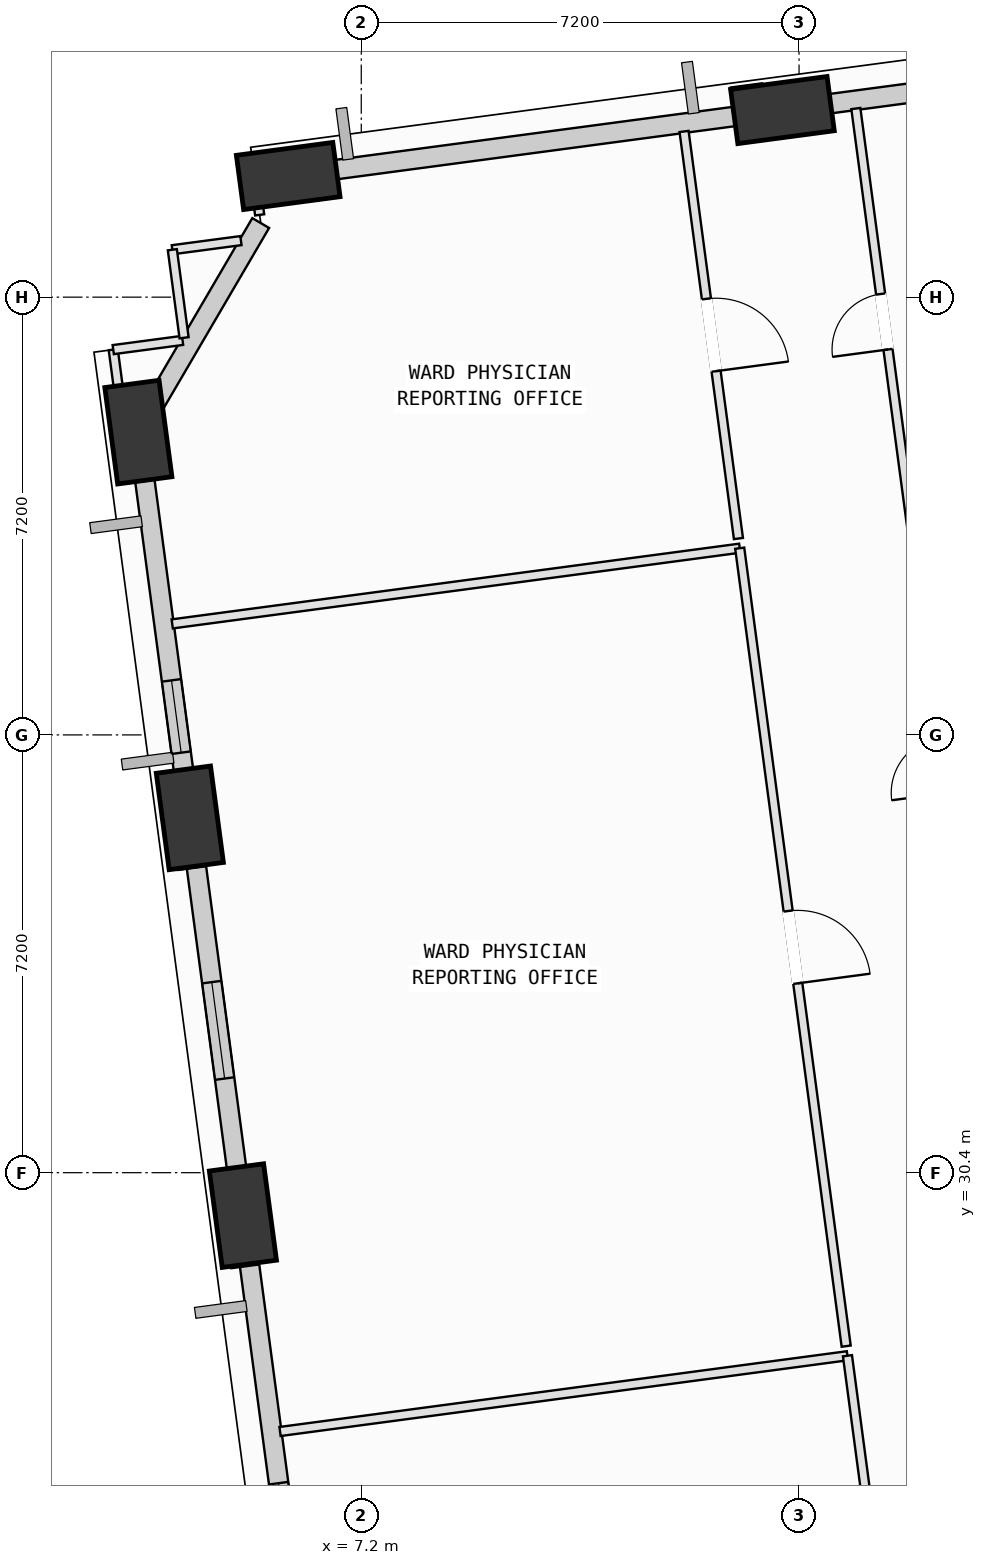
"""IFC4 building model, lengths in metres.
Left out: names, types, materials, properties, quantities, classifications, styles, units other than length and angle.
Written with IfcOpenShell. Run it as: python <this file> out.ifc"""

import sys

from ifc_helpers import new_model, si_unit, direction, frame, frame_2d, origin, origin_2d, place, context, subcontext, project, spatial, rectangle, extrude, element, fill, save


model = new_model("IFC4")
c1 = context("Model", 3, precision=1e-05, world=origin(), true_north=direction((0.0, 1.0)))
c2 = subcontext(c1, "Body", "Model", "MODEL_VIEW")
j1 = project(units=[si_unit("LENGTHUNIT", "METRE"), si_unit("PLANEANGLEUNIT", "RADIAN")], contexts=[c1])
p1 = place(None, origin())
s1 = spatial("IfcSite", under=j1, at=p1, CompositionType="ELEMENT")
p2 = place(p1, origin())
s2 = spatial("IfcBuilding", under=s1, at=p2, CompositionType="ELEMENT")
p3 = place(p2, frame((0.0, 0.0, 55.0)))
s3 = spatial("IfcBuildingStorey", under=s2, at=p3, CompositionType="ELEMENT", Elevation=55.0)
p4 = place(p3, frame((14.127, 47.877, 0.002), z_axis=(-0.0942550357, -0.080919918109, 0.992253977114), x_axis=(0.745242646619, -0.666590927141, 0.016429653498)))
e1 = element("IfcColumn", 1, at=p4, inside=s3, PredefinedType="COLUMN", context=c2, shape_type="SweptSolid", body=[
    extrude(rectangle(XDim=1.6, YDim=0.9, at=origin_2d()), origin(), (0.0, 0.0, 1.0), 4.028),
])
p5 = place(p3, frame((5.999, 46.792, 0.002), z_axis=(-0.089275820597, -0.113936981601, 0.989468641282), x_axis=(0.86094163533, -0.508343404316, 0.019143767761)))
e2 = element("IfcColumn", 2, at=p5, inside=s3, PredefinedType="COLUMN", context=c2, shape_type="SweptSolid", body=[
    extrude(rectangle(XDim=1.6, YDim=0.9, at=origin_2d()), origin(), (0.0, 0.0, 1.0), 4.039),
])
p6 = place(p3, frame((3.534, 42.58, 0.002), z_axis=(-0.071883508788, -0.123937084117, 0.98968295951), x_axis=(0.377774089532, 0.914941616728, 0.142016109148)))
e3 = element("IfcColumn", 3, at=p6, inside=s3, PredefinedType="COLUMN", context=c2, shape_type="SweptSolid", body=[
    extrude(rectangle(XDim=1.6, YDim=0.9, at=origin_2d()), origin(), (0.0, 0.0, 1.0), 4.038),
])
p7 = place(p3, frame((4.381, 36.236, 0.002), z_axis=(-0.0460385753, -0.120487797725, 0.991646681124), x_axis=(0.227297063468, 0.965396391624, 0.127850897445)))
e4 = element("IfcColumn", 4, at=p7, inside=s3, PredefinedType="COLUMN", context=c2, shape_type="SweptSolid", body=[
    extrude(rectangle(XDim=1.6, YDim=0.9, at=origin_2d()), origin(), (0.0, 0.0, 1.0), 4.03),
])
p8 = place(p3, frame((5.254, 29.694, 0.002), z_axis=(-0.019167847977, -0.116826820265, 0.992967314503), x_axis=(0.028843585156, 0.992671797796, 0.11734883662)))
e5 = element("IfcColumn", 5, at=p8, inside=s3, PredefinedType="COLUMN", context=c2, shape_type="SweptSolid", body=[
    extrude(rectangle(XDim=1.6, YDim=0.9, at=origin_2d()), origin(), (0.0, 0.0, 1.0), 4.025),
])
p9 = place(p3, frame((14.506, 47.928, 0.0), z_axis=(0.0, 0.0, 1.0), x_axis=(0.991218459324, 0.132234510981, 0.0)))
e6 = element("IfcWall", 6, at=p9, inside=s3, PredefinedType="SOLIDWALL", context=c2, shape_type="SweptSolid", body=[
    extrude(rectangle(XDim=7.003, YDim=0.32, at=frame_2d((3.501, 0.0))), origin(), (0.0, 0.0, 1.0), 3.165),
])
p10 = place(p3, frame((6.359, 46.841, 0.0), z_axis=(0.0, 0.0, 1.0), x_axis=(0.991214255341, 0.132266019857, 0.0)))
e7 = element("IfcWall", 7, at=p10, inside=s3, PredefinedType="SOLIDWALL", context=c2, shape_type="SweptSolid", body=[
    extrude(rectangle(XDim=7.034, YDim=0.32, at=frame_2d((3.517, 0.0))), origin(), (0.0, 0.0, 1.0), 3.165),
])
p11 = place(p3, frame((3.695, 42.854, 0.0), z_axis=(0.0, 0.0, 1.0), x_axis=(0.504934807204, 0.863157483009, 0.0)))
e8 = element("IfcWall", 8, at=p11, inside=s3, PredefinedType="SOLIDWALL", context=c2, shape_type="SweptSolid", body=[
    extrude(rectangle(XDim=3.666, YDim=0.32, at=frame_2d((1.833, 0.0))), origin(), (0.0, 0.0, 1.0), 3.165),
])
p12 = place(p3, frame((4.333, 36.599, 0.0), z_axis=(0.0, 0.0, 1.0), x_axis=(-0.132286193068, 0.991211563252, 0.0)))
e9 = element("IfcWall", 9, at=p12, inside=s3, PredefinedType="SOLIDWALL", context=c2, shape_type="SweptSolid", body=[
    extrude(rectangle(XDim=5.223, YDim=0.32, at=frame_2d((2.611, 0.0))), origin(), (0.0, 0.0, 1.0), 3.165),
])
p13 = place(p12, frame((0.715, 0.0, 0.75)))
e10 = element("IfcOpeningElement", 10, at=p13, cuts=e9, PredefinedType="OPENING", context=c2, shape_type="SweptSolid", body=[
    extrude(rectangle(XDim=1.2, YDim=1.75, at=frame_2d((0.6, 0.875))), frame((0.0, 0.17, 0.0), z_axis=(0.0, -1.0, 0.0), x_axis=(1.0, 0.0, 0.0)), (0.0, 0.0, 1.0), 0.34),
])
p14 = place(p3, frame((5.204, 30.066, 0.0), z_axis=(0.0, 0.0, 1.0), x_axis=(-0.132270316662, 0.991213681973, 0.0)))
e11 = element("IfcWall", 11, at=p14, inside=s3, PredefinedType="SOLIDWALL", context=c2, shape_type="SweptSolid", body=[
    extrude(rectangle(XDim=5.401, YDim=0.32, at=frame_2d((2.7, 0.0))), origin(), (0.0, 0.0, 1.0), 3.165),
])
p15 = place(p14, frame((1.898, 0.0, 0.75)))
e12 = element("IfcOpeningElement", 12, at=p15, cuts=e11, PredefinedType="OPENING", context=c2, shape_type="SweptSolid", body=[
    extrude(rectangle(XDim=1.6, YDim=1.95, at=frame_2d((0.8, 0.975))), frame((0.0, 0.17, 0.0), z_axis=(0.0, -1.0, 0.0), x_axis=(1.0, 0.0, 0.0)), (0.0, 0.0, 1.0), 0.34),
])
p16 = place(p3, frame((6.083, 23.479, 0.0), z_axis=(0.0, 0.0, 1.0), x_axis=(-0.132257820525, 0.991215349412, 0.0)))
e13 = element("IfcWall", 13, at=p16, inside=s3, PredefinedType="SOLIDWALL", context=c2, shape_type="SweptSolid", body=[
    extrude(rectangle(XDim=5.438, YDim=0.32, at=frame_2d((2.719, 0.0))), origin(), (0.0, 0.0, 1.0), 3.165),
])
p17 = place(p16, frame((0.63, 0.0, 0.75)))
e14 = element("IfcOpeningElement", 14, at=p17, cuts=e13, PredefinedType="OPENING", context=c2, shape_type="SweptSolid", body=[
    extrude(rectangle(XDim=1.2, YDim=1.75, at=frame_2d((0.6, 0.875))), frame((0.0, 0.17, 0.0), z_axis=(0.0, -1.0, 0.0), x_axis=(1.0, 0.0, 0.0)), (0.0, 0.0, 1.0), 0.34),
])
p18 = place(p3, frame((5.864, 26.143, 0.0), z_axis=(0.0, 0.0, 1.0), x_axis=(0.991205918813, 0.132328479586, 0.0)))
e15 = element("IfcWall", 15, at=p18, inside=s3, PredefinedType="PARTITIONING", context=c2, shape_type="SweptSolid", body=[
    extrude(rectangle(XDim=9.415, YDim=0.15, at=frame_2d((4.708, 0.0))), origin(), (0.0, 0.0, 1.0), 3.78),
])
p19 = place(p3, frame((15.196, 27.389, 0.0), z_axis=(0.0, 0.0, 1.0), x_axis=(0.132180016539, -0.991225727687, 0.0)))
e16 = element("IfcWall", 16, at=p19, inside=s3, PredefinedType="PARTITIONING", context=c2, shape_type="SweptSolid", body=[
    extrude(rectangle(XDim=6.869, YDim=0.15, at=frame_2d((3.435, 0.0))), origin(), (0.0, 0.0, 1.0), 3.78),
])
p20 = place(p19, frame((2.835, 0.0, 0.0)))
e17 = element("IfcOpeningElement", 17, at=p20, cuts=e16, PredefinedType="OPENING", context=c2, shape_type="SweptSolid", body=[
    extrude(rectangle(XDim=1.2, YDim=2.15, at=frame_2d((0.6, 1.075))), frame((0.0, 0.085, 0.0), z_axis=(0.0, -1.0, 0.0), x_axis=(1.0, 0.0, 0.0)), (0.0, 0.0, 1.0), 0.17),
])
p21 = place(p3, frame((4.091, 39.426, 0.0), z_axis=(0.0, 0.0, 1.0), x_axis=(0.991221332239, 0.132212974079, 0.0)))
e18 = element("IfcWall", 18, at=p21, inside=s3, PredefinedType="PARTITIONING", context=c2, shape_type="SweptSolid", body=[
    extrude(rectangle(XDim=9.416, YDim=0.15, at=frame_2d((4.708, 0.0))), origin(), (0.0, 0.0, 1.0), 3.78),
])
p22 = place(p3, frame((13.424, 40.671, 0.0), z_axis=(0.0, 0.0, 1.0), x_axis=(0.132248267647, -0.991216624005, 0.0)))
e19 = element("IfcWall", 19, at=p22, inside=s3, PredefinedType="PARTITIONING", context=c2, shape_type="SweptSolid", body=[
    extrude(rectangle(XDim=13.24, YDim=0.15, at=frame_2d((6.62, 0.0))), origin(), (0.0, 0.0, 1.0), 2.865),
])
p23 = place(p22, frame((6.02, 0.0, 0.0)))
e20 = element("IfcOpeningElement", 20, at=p23, cuts=e19, PredefinedType="OPENING", context=c2, shape_type="SweptSolid", body=[
    extrude(rectangle(XDim=1.2, YDim=2.15, at=frame_2d((0.6, 1.075))), frame((0.0, 0.085, 0.0), z_axis=(0.0, -1.0, 0.0), x_axis=(1.0, 0.0, 0.0)), (0.0, 0.0, 1.0), 0.17),
])
p24 = place(p3, frame((5.136, 28.839, 0.0), z_axis=(0.0, 0.0, 1.0), x_axis=(-0.132441852049, 0.991190776705, 0.0)))
e21 = element("IfcWall", 21, at=p24, inside=s3, PredefinedType="PARTITIONING", context=c2, shape_type="SweptSolid", body=[
    extrude(rectangle(XDim=1.208, YDim=0.15, at=frame_2d((0.604, 0.0))), origin(), (0.0, 0.0, 1.0), 3.165),
])
p25 = place(p3, frame((4.262, 35.389, 0.0), z_axis=(0.0, 0.0, 1.0), x_axis=(-0.131854777678, 0.991269044005, 0.0)))
e22 = element("IfcWall", 22, at=p25, inside=s3, PredefinedType="PARTITIONING", context=c2, shape_type="SweptSolid", body=[
    extrude(rectangle(XDim=1.191, YDim=0.15, at=frame_2d((0.595, 0.0))), origin(), (0.0, 0.0, 1.0), 3.165),
])
p26 = place(p3, frame((4.093, 45.58, 0.0), z_axis=(0.0, 0.0, 1.0), x_axis=(0.991284028558, 0.131742076523, 0.0)))
e23 = element("IfcWall", 23, at=p26, inside=s3, PredefinedType="PARTITIONING", context=c2, shape_type="SweptSolid", body=[
    extrude(rectangle(XDim=1.138, YDim=0.15, at=frame_2d((0.569, 0.0))), origin(), (0.0, 0.0, 1.0), 3.78),
])
p27 = place(p3, frame((5.529, 46.153, 0.0), z_axis=(0.0, 0.0, 1.0), x_axis=(-0.132206803719, 0.991222155246, 0.0)))
e24 = element("IfcWall", 24, at=p27, inside=s3, PredefinedType="PARTITIONING", context=c2, shape_type="SweptSolid", body=[
    extrude(rectangle(XDim=0.742, YDim=0.15, at=frame_2d((0.371, 0.0))), origin(), (0.0, 0.0, 1.0), 2.865),
])
p28 = place(p3, frame((5.431, 46.889, 0.0), z_axis=(0.0, 0.0, 1.0), x_axis=(0.991167081628, 0.132619064604, 0.0)))
e25 = element("IfcWall", 25, at=p28, inside=s3, PredefinedType="PARTITIONING", context=c2, shape_type="SweptSolid", body=[
    extrude(rectangle(XDim=0.913, YDim=0.15, at=frame_2d((0.457, 0.0))), origin(), (0.0, 0.0, 1.0), 3.78),
])
p29 = place(p3, frame((12.509, 47.525, 0.0), z_axis=(0.0, 0.0, 1.0), x_axis=(0.132367335559, -0.991200730668, 0.0)))
e26 = element("IfcWall", 26, at=p29, inside=s3, PredefinedType="PARTITIONING", context=c2, shape_type="SweptSolid", body=[
    extrude(rectangle(XDim=6.754, YDim=0.15, at=frame_2d((3.377, 0.0))), origin(), (0.0, 0.0, 1.0), 2.865),
])
p30 = place(p29, frame((2.777, 0.0, 0.0)))
e27 = element("IfcOpeningElement", 27, at=p30, cuts=e26, PredefinedType="OPENING", context=c2, shape_type="SweptSolid", body=[
    extrude(rectangle(XDim=1.2, YDim=2.15, at=frame_2d((0.6, 1.075))), frame((0.0, 0.085, 0.0), z_axis=(0.0, -1.0, 0.0), x_axis=(1.0, 0.0, 0.0)), (0.0, 0.0, 1.0), 0.17),
])
p31 = place(p3, frame((3.413, 41.746, 0.0), z_axis=(0.0, 0.0, 1.0), x_axis=(-0.13210583879, 0.99123561647, 0.0)))
e28 = element("IfcWall", 28, at=p31, inside=s3, PredefinedType="PARTITIONING", context=c2, shape_type="SweptSolid", body=[
    extrude(rectangle(XDim=2.21, YDim=0.15, at=frame_2d((1.105, 0.0))), origin(), (0.0, 0.0, 1.0), 3.165),
])
p32 = place(p3, frame((3.121, 43.937, 0.0), z_axis=(0.0, 0.0, 1.0), x_axis=(0.991214917044, 0.132261060895, 0.0)))
e29 = element("IfcWall", 29, at=p32, inside=s3, PredefinedType="PARTITIONING", context=c2, shape_type="SweptSolid", body=[
    extrude(rectangle(XDim=1.15, YDim=0.15, at=frame_2d((0.575, 0.0))), origin(), (0.0, 0.0, 1.0), 3.78),
])
p33 = place(p3, frame((4.286, 44.132, 0.0), z_axis=(0.0, 0.0, 1.0), x_axis=(-0.132032350719, 0.991245407739, 0.0)))
e30 = element("IfcWall", 30, at=p33, inside=s3, PredefinedType="PARTITIONING", context=c2, shape_type="SweptSolid", body=[
    extrude(rectangle(XDim=1.461, YDim=0.15, at=frame_2d((0.73, 0.0))), origin(), (0.0, 0.0, 1.0), 3.78),
])
p34 = place(p3, frame((16.27, 40.889, 0.0), z_axis=(0.0, 0.0, 1.0), x_axis=(-0.132294810416, 0.99121041315, 0.0)))
e31 = element("IfcWall", 31, at=p34, inside=s3, PredefinedType="PARTITIONING", context=c2, shape_type="SweptSolid", body=[
    extrude(rectangle(XDim=7.075, YDim=0.15, at=frame_2d((3.538, 0.0))), origin(), (0.0, 0.0, 1.0), 3.78),
])
p35 = place(p34, frame((3.078, 0.0, 0.0)))
e32 = element("IfcOpeningElement", 32, at=p35, cuts=e31, PredefinedType="OPENING", context=c2, shape_type="SweptSolid", body=[
    extrude(rectangle(XDim=0.92, YDim=2.1, at=frame_2d((0.46, 1.05))), frame((0.0, 0.085, 0.0), z_axis=(0.0, -1.0, 0.0), x_axis=(1.0, 0.0, 0.0)), (0.0, 0.0, 1.0), 0.17),
])
p36 = place(p13, origin())
e33 = element("IfcWindow", 33, at=p36, inside=s3, PartitioningType="SINGLE_PANEL", PredefinedType="WINDOW", context=c2, shape_type="SweptSolid", body=[
    extrude(rectangle(XDim=1.2, YDim=1.75, at=frame_2d((0.6, 0.875))), frame((0.0, 0.03, 0.0), z_axis=(0.0, -1.0, 0.0), x_axis=(1.0, 0.0, 0.0)), (0.0, 0.0, 1.0), 0.06),
])
fill(e10, e33)
p37 = place(p15, origin())
e34 = element("IfcWindow", 34, at=p37, inside=s3, PartitioningType="SINGLE_PANEL", PredefinedType="WINDOW", context=c2, shape_type="SweptSolid", body=[
    extrude(rectangle(XDim=1.6, YDim=1.95, at=frame_2d((0.8, 0.975))), frame((0.0, 0.03, 0.0), z_axis=(0.0, -1.0, 0.0), x_axis=(1.0, 0.0, 0.0)), (0.0, 0.0, 1.0), 0.06),
])
fill(e12, e34)
p38 = place(p17, origin())
e35 = element("IfcWindow", 35, at=p38, inside=s3, PartitioningType="SINGLE_PANEL", PredefinedType="WINDOW", context=c2, shape_type="SweptSolid", body=[
    extrude(rectangle(XDim=1.2, YDim=1.75, at=frame_2d((0.6, 0.875))), frame((0.0, 0.03, 0.0), z_axis=(0.0, -1.0, 0.0), x_axis=(1.0, 0.0, 0.0)), (0.0, 0.0, 1.0), 0.06),
])
fill(e14, e35)
p39 = place(p23, origin())
e36 = element("IfcDoor", 36, at=p39, inside=s3, OperationType="SINGLE_SWING_RIGHT", PredefinedType="DOOR", context=c2, shape_type="SweptSolid", body=[
    extrude(rectangle(XDim=1.2, YDim=2.15, at=frame_2d((0.6, 1.075))), frame((0.0, 0.025, 0.0), z_axis=(0.0, -1.0, 0.0), x_axis=(1.0, 0.0, 0.0)), (0.0, 0.0, 1.0), 0.05),
])
fill(e20, e36)
p40 = place(p30, origin())
e37 = element("IfcDoor", 37, at=p40, inside=s3, OperationType="SINGLE_SWING_RIGHT", PredefinedType="DOOR", context=c2, shape_type="SweptSolid", body=[
    extrude(rectangle(XDim=1.2, YDim=2.15, at=frame_2d((0.6, 1.075))), frame((0.0, 0.025, 0.0), z_axis=(0.0, -1.0, 0.0), x_axis=(1.0, 0.0, 0.0)), (0.0, 0.0, 1.0), 0.05),
])
fill(e27, e37)
p41 = place(p35, origin())
e38 = element("IfcDoor", 38, at=p41, inside=s3, OperationType="SINGLE_SWING_LEFT", PredefinedType="DOOR", context=c2, shape_type="SweptSolid", body=[
    extrude(rectangle(XDim=0.92, YDim=2.1, at=frame_2d((0.46, 1.05))), frame((0.0, 0.025, 0.0), z_axis=(0.0, -1.0, 0.0), x_axis=(1.0, 0.0, 0.0)), (0.0, 0.0, 1.0), 0.05),
])
fill(e32, e38)
save(model, sys.argv[1])
